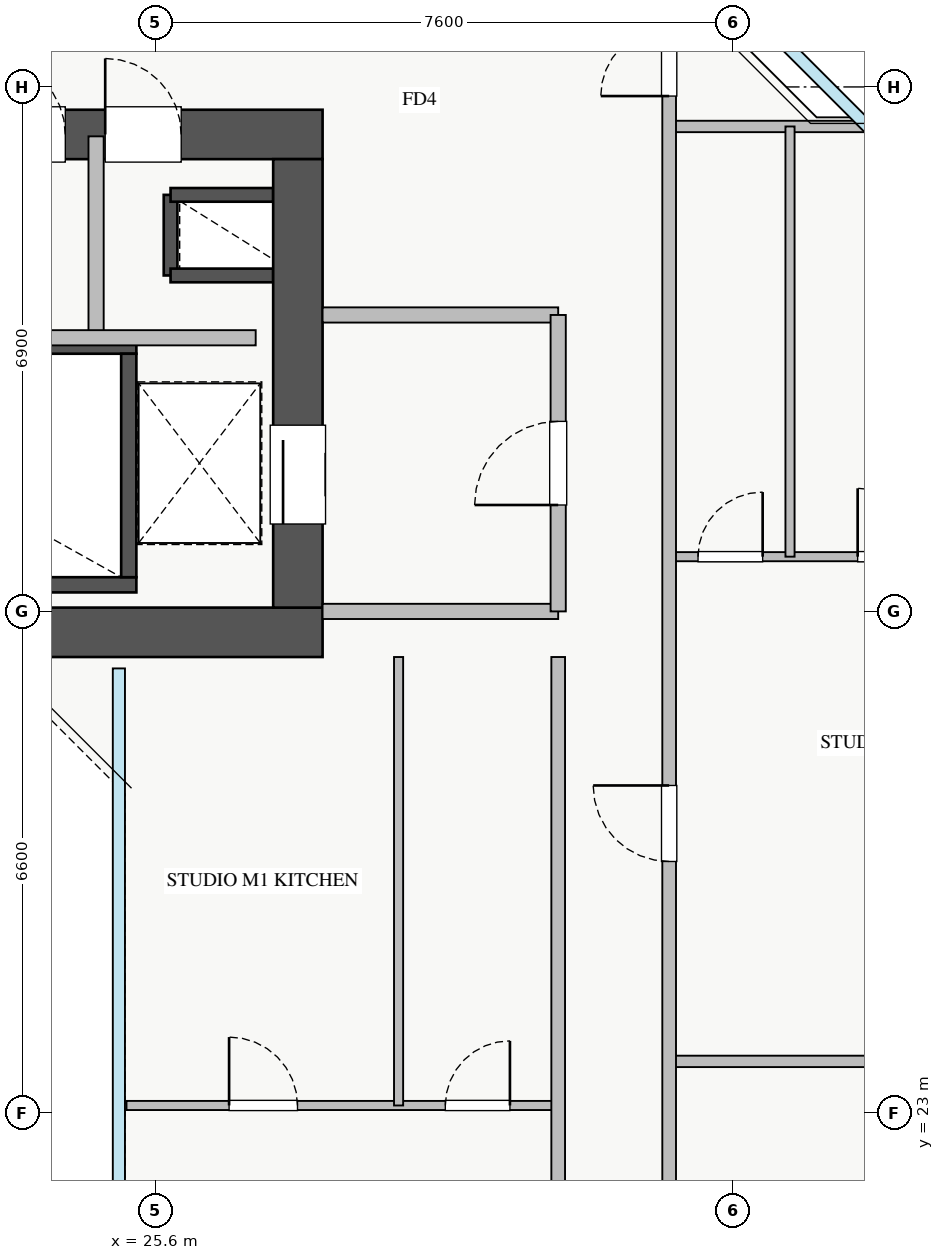
"""IFC4 building model, lengths in metres.
Left out: names, types, materials, properties, quantities, classifications, styles, units other than length and angle.
Written with IfcOpenShell. Run it as: python <this file> out.ifc"""

import sys

from ifc_helpers import new_model, si_unit, direction, frame, frame_2d, origin, place, context, subcontext, project, spatial, rectangle, extrude, source, transform, mapped, element, fill, save


model = new_model("IFC4")
c1 = context("Model", 3, precision=1e-05, world=origin(), true_north=direction((0.0, 1.0)))
c2 = subcontext(c1, "Body", "Model", "MODEL_VIEW")
j1 = project(units=[si_unit("LENGTHUNIT", "METRE"), si_unit("PLANEANGLEUNIT", "RADIAN")], contexts=[c1])
p1 = place(None, origin())
s1 = spatial("IfcSite", under=j1, at=p1, CompositionType="ELEMENT")
p2 = place(p1, origin())
s2 = spatial("IfcBuilding", under=s1, at=p2, CompositionType="ELEMENT")
p3 = place(p2, frame((0.0, 0.0, 143.75)))
s3 = spatial("IfcBuildingStorey", under=s2, at=p3, CompositionType="ELEMENT", Elevation=143.75)
p4 = place(p3, frame((25.8, 34.02, 0.0), z_axis=(0.0, 0.0, 1.0), x_axis=(0.0, 1.0, 0.0)))
e1 = element("IfcWall", 1, at=p4, inside=s3, PredefinedType="SHEAR", context=c2, shape_type="SweptSolid", body=[
    extrude(rectangle(XDim=1.06, YDim=0.18, at=frame_2d((0.53, 0.0))), origin(), (0.0, 0.0, 1.0), 3.07),
])
for number, where, z_axis, x_axis in (
    (2, (25.8, 35.08, 0.0), (0.0, 0.0, 1.0), (1.0, 0.0, 0.0)),
    (3, (25.8, 34.02, 0.0), (0.0, 0.0, 1.0), (1.0, 0.0, 0.0)),
):
    element("IfcWall", number, at=place(p3, frame(where, z_axis=z_axis, x_axis=x_axis)), inside=s3, PredefinedType="SHEAR", context=c2, shape_type="SweptSolid", body=[
        extrude(rectangle(XDim=1.35, YDim=0.18, at=frame_2d((0.675, 0.0))), origin(), (0.0, 0.0, 1.0), 3.07),
    ])
p5 = place(p3, frame((18.2, 29.95, 0.0), z_axis=(0.0, 0.0, 1.0), x_axis=(1.0, 0.0, 0.0)))
e4 = element("IfcWall", 4, at=p5, inside=s3, PredefinedType="SHEAR", context=c2, shape_type="SweptSolid", body=[
    extrude(rectangle(XDim=7.15, YDim=0.2, at=frame_2d((3.575, 0.0))), origin(), (0.0, 0.0, 1.0), 3.25),
])
p6 = place(p3, frame((18.2, 33.09, 0.0), z_axis=(0.0, 0.0, 1.0), x_axis=(1.0, 0.0, 0.0)))
e5 = element("IfcWall", 5, at=p6, inside=s3, PredefinedType="SHEAR", context=c2, shape_type="SweptSolid", body=[
    extrude(rectangle(XDim=7.15, YDim=0.2, at=frame_2d((3.575, 0.0))), origin(), (0.0, 0.0, 1.0), 3.25),
])
p7 = place(p6, frame((0.35, 0.0, 0.0)))
e6 = element("IfcOpeningElement", 6, at=p7, cuts=e5, PredefinedType="OPENING", context=c2, shape_type="SweptSolid", body=[
    extrude(rectangle(XDim=1.1, YDim=2.05, at=frame_2d((0.55, 1.025))), frame((0.0, 0.11, 0.0), z_axis=(0.0, -1.0, 0.0), x_axis=(1.0, 0.0, 0.0)), (0.0, 0.0, 1.0), 0.22),
])
p8 = place(p3, frame((25.25, 30.05, 0.0), z_axis=(0.0, 0.0, 1.0), x_axis=(0.0, 1.0, 0.0)))
e7 = element("IfcWall", 7, at=p8, inside=s3, PredefinedType="SHEAR", context=c2, shape_type="SweptSolid", body=[
    extrude(rectangle(XDim=2.94, YDim=0.2, at=frame_2d((1.47, 0.0))), origin(), (0.0, 0.0, 1.0), 3.25),
])
p9 = place(p3, frame((10.2, 29.325, 0.0), z_axis=(0.0, 0.0, 1.0), x_axis=(1.0, 0.0, 0.0)))
e8 = element("IfcWall", 8, at=p9, inside=s3, PredefinedType="SHEAR", context=c2, shape_type="SweptSolid", body=[
    extrude(rectangle(XDim=17.6, YDim=0.65, at=frame_2d((8.8, 0.0))), origin(), (0.0, 0.0, 1.0), 3.25),
])
p10 = place(p3, frame((10.2, 35.875, 0.0), z_axis=(0.0, 0.0, 1.0), x_axis=(1.0, 0.0, 0.0)))
e9 = element("IfcWall", 9, at=p10, inside=s3, PredefinedType="SHEAR", context=c2, shape_type="SweptSolid", body=[
    extrude(rectangle(XDim=17.6, YDim=0.65, at=frame_2d((8.8, 0.0))), origin(), (0.0, 0.0, 1.0), 3.25),
])
p11 = place(p10, frame((1.15, 0.0, 0.0)))
e10 = element("IfcOpeningElement", 10, at=p11, cuts=e9, PredefinedType="OPENING", context=c2, shape_type="SweptSolid", body=[
    extrude(rectangle(XDim=1.1, YDim=2.05, at=frame_2d((0.55, 1.025))), frame((0.0, 0.335, 0.0), z_axis=(0.0, -1.0, 0.0), x_axis=(1.0, 0.0, 0.0)), (0.0, 0.0, 1.0), 0.67),
])
p12 = place(p10, frame((8.3, 0.0, 0.0)))
e11 = element("IfcOpeningElement", 11, at=p12, cuts=e9, PredefinedType="OPENING", context=c2, shape_type="SweptSolid", body=[
    extrude(rectangle(XDim=1.1, YDim=2.05, at=frame_2d((0.55, 1.025))), frame((0.0, 0.335, 0.0), z_axis=(0.0, -1.0, 0.0), x_axis=(1.0, 0.0, 0.0)), (0.0, 0.0, 1.0), 0.67),
])
p13 = place(p10, frame((4.9, 0.0, 0.0)))
e12 = element("IfcOpeningElement", 12, at=p13, cuts=e9, PredefinedType="OPENING", context=c2, shape_type="SweptSolid", body=[
    extrude(rectangle(XDim=1.1, YDim=2.05, at=frame_2d((0.55, 1.025))), frame((0.0, 0.335, 0.0), z_axis=(0.0, -1.0, 0.0), x_axis=(1.0, 0.0, 0.0)), (0.0, 0.0, 1.0), 0.67),
])
p14 = place(p10, frame((14.74, 0.0, 0.0)))
e13 = element("IfcOpeningElement", 13, at=p14, cuts=e9, PredefinedType="OPENING", context=c2, shape_type="SweptSolid", body=[
    extrude(rectangle(XDim=1.0, YDim=2.05, at=frame_2d((0.5, 1.025))), frame((0.0, 0.335, 0.0), z_axis=(0.0, -1.0, 0.0), x_axis=(1.0, 0.0, 0.0)), (0.0, 0.0, 1.0), 0.67),
])
p15 = place(p10, frame((10.005, 0.0, 0.0)))
e14 = element("IfcOpeningElement", 14, at=p15, cuts=e9, PredefinedType="OPENING", context=c2, shape_type="SweptSolid", body=[
    extrude(rectangle(XDim=1.0, YDim=2.05, at=frame_2d((0.5, 1.025))), frame((0.0, 0.335, 0.0), z_axis=(0.0, -1.0, 0.0), x_axis=(1.0, 0.0, 0.0)), (0.0, 0.0, 1.0), 0.67),
])
p16 = place(p10, frame((11.55, 0.0, 0.0)))
e15 = element("IfcOpeningElement", 15, at=p16, cuts=e9, PredefinedType="OPENING", context=c2, shape_type="SweptSolid", body=[
    extrude(rectangle(XDim=1.0, YDim=2.05, at=frame_2d((0.5, 1.025))), frame((0.0, 0.335, 0.0), z_axis=(0.0, -1.0, 0.0), x_axis=(1.0, 0.0, 0.0)), (0.0, 0.0, 1.0), 0.67),
])
p17 = place(p10, frame((13.215, 0.0, 0.0)))
e16 = element("IfcOpeningElement", 16, at=p17, cuts=e9, PredefinedType="OPENING", context=c2, shape_type="SweptSolid", body=[
    extrude(rectangle(XDim=1.0, YDim=2.05, at=frame_2d((0.5, 1.025))), frame((0.0, 0.335, 0.0), z_axis=(0.0, -1.0, 0.0), x_axis=(1.0, 0.0, 0.0)), (0.0, 0.0, 1.0), 0.67),
])
p18 = place(p3, frame((27.475, 29.65, 0.0), z_axis=(0.0, 0.0, 1.0), x_axis=(0.0, 1.0, 0.0)))
e17 = element("IfcWall", 17, at=p18, inside=s3, PredefinedType="SHEAR", context=c2, shape_type="SweptSolid", body=[
    extrude(rectangle(XDim=5.9, YDim=0.65, at=frame_2d((2.95, 0.0))), origin(), (0.0, 0.0, 1.0), 3.25),
])
p19 = place(p18, frame((1.1, 0.0, 0.0)))
e18 = element("IfcOpeningElement", 18, at=p19, cuts=e17, PredefinedType="OPENING", context=c2, shape_type="SweptSolid", body=[
    extrude(rectangle(XDim=1.3, YDim=2.05, at=frame_2d((0.65, 1.025))), frame((0.0, 0.335, 0.0), z_axis=(0.0, -1.0, 0.0), x_axis=(1.0, 0.0, 0.0)), (0.0, 0.0, 1.0), 0.67),
])
for number, where, z_axis, x_axis in (
    (19, (27.8, 29.6, 0.0), (0.0, 0.0, 1.0), (1.0, 0.0, 0.0)),
    (20, (27.8, 33.5, 0.0), (0.0, 0.0, 1.0), (1.0, 0.0, 0.0)),
):
    element("IfcWall", number, at=place(p3, frame(where, z_axis=z_axis, x_axis=x_axis)), inside=s3, PredefinedType="PARTITIONING", context=c2, shape_type="SweptSolid", body=[
        extrude(rectangle(XDim=3.1, YDim=0.2, at=frame_2d((1.55, 0.0))), origin(), (0.0, 0.0, 1.0), 3.07),
    ])
p20 = place(p3, frame((30.9, 29.6, 0.0), z_axis=(0.0, 0.0, 1.0), x_axis=(0.0, 1.0, 0.0)))
e21 = element("IfcWall", 21, at=p20, inside=s3, PredefinedType="PARTITIONING", context=c2, shape_type="SweptSolid", body=[
    extrude(rectangle(XDim=3.9, YDim=0.2, at=frame_2d((1.95, 0.0))), origin(), (0.0, 0.0, 1.0), 3.07),
])
p21 = place(p20, frame((1.4, 0.0, 0.0)))
e22 = element("IfcOpeningElement", 22, at=p21, cuts=e21, PredefinedType="OPENING", context=c2, shape_type="SweptSolid", body=[
    extrude(rectangle(XDim=1.1, YDim=2.05, at=frame_2d((0.55, 1.025))), frame((0.0, 0.11, 0.0), z_axis=(0.0, -1.0, 0.0), x_axis=(1.0, 0.0, 0.0)), (0.0, 0.0, 1.0), 0.22),
])
p22 = place(p3, frame((24.82, 33.2, 0.0), z_axis=(0.0, 0.0, 1.0), x_axis=(0.0, 1.0, 0.0)))
e23 = element("IfcWall", 23, at=p22, inside=s3, PredefinedType="PARTITIONING", context=c2, shape_type="SweptSolid", body=[
    extrude(rectangle(XDim=2.65, YDim=0.2, at=frame_2d((1.325, 0.0))), origin(), (0.0, 0.0, 1.0), 3.07),
])
p23 = place(p3, frame((21.75, 33.2, 0.0), z_axis=(0.0, 0.0, 1.0), x_axis=(1.0, 0.0, 0.0)))
e24 = element("IfcWall", 24, at=p23, inside=s3, PredefinedType="PARTITIONING", context=c2, shape_type="SweptSolid", body=[
    extrude(rectangle(XDim=5.17, YDim=0.2, at=frame_2d((2.585, 0.0))), origin(), (0.0, 0.0, 1.0), 3.07),
])
p24 = place(p3, frame((32.36, 35.98, 0.0), z_axis=(0.0, 0.0, 1.0), x_axis=(1.0, 0.0, 0.0)))
e25 = element("IfcWall", 25, at=p24, inside=s3, PredefinedType="PARTITIONING", context=c2, shape_type="SweptSolid", body=[
    extrude(rectangle(XDim=4.29, YDim=0.15, at=frame_2d((2.145, 0.0))), origin(), (0.0, 0.0, 1.0), 3.07),
])
p25 = place(p3, frame((32.36, 30.32, 0.0), z_axis=(0.0, 0.0, 1.0), x_axis=(1.0, 0.0, 0.0)))
e26 = element("IfcWall", 26, at=p25, inside=s3, PredefinedType="PLUMBINGWALL", context=c2, shape_type="SweptSolid", body=[
    extrude(rectangle(XDim=4.29, YDim=0.12, at=frame_2d((2.145, 0.0))), origin(), (0.0, 0.0, 1.0), 3.07),
])
p26 = place(p25, frame((0.38, 0.0, 0.0)))
e27 = element("IfcOpeningElement", 27, at=p26, cuts=e26, PredefinedType="OPENING", context=c2, shape_type="SweptSolid", body=[
    extrude(rectangle(XDim=0.85, YDim=2.05, at=frame_2d((0.425, 1.025))), frame((0.0, 0.07, 0.0), z_axis=(0.0, -1.0, 0.0), x_axis=(1.0, 0.0, 0.0)), (0.0, 0.0, 1.0), 0.14),
])
p27 = place(p25, frame((2.48, 0.0, 0.0)))
e28 = element("IfcOpeningElement", 28, at=p27, cuts=e26, PredefinedType="OPENING", context=c2, shape_type="SweptSolid", body=[
    extrude(rectangle(XDim=0.9, YDim=2.05, at=frame_2d((0.45, 1.025))), frame((0.0, 0.07, 0.0), z_axis=(0.0, -1.0, 0.0), x_axis=(1.0, 0.0, 0.0)), (0.0, 0.0, 1.0), 0.14),
])
p28 = place(p3, frame((33.95, 30.32, 0.0), z_axis=(0.0, 0.0, 1.0), x_axis=(0.0, 1.0, 0.0)))
e29 = element("IfcWall", 29, at=p28, inside=s3, PredefinedType="PLUMBINGWALL", context=c2, shape_type="SweptSolid", body=[
    extrude(rectangle(XDim=5.66, YDim=0.12, at=frame_2d((2.83, 0.0))), origin(), (0.0, 0.0, 1.0), 3.07),
])
p29 = place(p3, frame((32.36, 23.68, 0.0), z_axis=(0.0, 0.0, 1.0), x_axis=(1.0, 0.0, 0.0)))
e30 = element("IfcWall", 30, at=p29, inside=s3, PredefinedType="PARTITIONING", context=c2, shape_type="SweptSolid", body=[
    extrude(rectangle(XDim=4.29, YDim=0.15, at=frame_2d((2.145, 0.0))), origin(), (0.0, 0.0, 1.0), 3.07),
])
p30 = place(p3, frame((32.36, 8.3, 0.0), z_axis=(0.0, 0.0, 1.0), x_axis=(0.0, 1.0, 0.0)))
e31 = element("IfcWall", 31, at=p30, inside=s3, PredefinedType="PARTITIONING", context=c2, shape_type="SweptSolid", body=[
    extrude(rectangle(XDim=29.4, YDim=0.18, at=frame_2d((14.7, 0.0))), origin(), (0.0, 0.0, 1.0), 3.07),
])
p31 = place(p30, frame((28.08, 0.0, 0.0)))
e32 = element("IfcOpeningElement", 32, at=p31, cuts=e31, PredefinedType="OPENING", context=c2, shape_type="SweptSolid", body=[
    extrude(rectangle(XDim=0.9, YDim=2.05, at=frame_2d((0.45, 1.025))), frame((0.0, 0.1, 0.0), z_axis=(0.0, -1.0, 0.0), x_axis=(1.0, 0.0, 0.0)), (0.0, 0.0, 1.0), 0.2),
])
p32 = place(p30, frame((0.42, 0.0, 0.0)))
e33 = element("IfcOpeningElement", 33, at=p32, cuts=e31, PredefinedType="OPENING", context=c2, shape_type="SweptSolid", body=[
    extrude(rectangle(XDim=0.9, YDim=2.05, at=frame_2d((0.45, 1.025))), frame((0.0, 0.1, 0.0), z_axis=(0.0, -1.0, 0.0), x_axis=(1.0, 0.0, 0.0)), (0.0, 0.0, 1.0), 0.2),
])
p33 = place(p30, frame((8.05, 0.0, 0.0)))
e34 = element("IfcOpeningElement", 34, at=p33, cuts=e31, PredefinedType="OPENING", context=c2, shape_type="SweptSolid", body=[
    extrude(rectangle(XDim=1.0, YDim=2.05, at=frame_2d((0.5, 1.025))), frame((0.0, 0.1, 0.0), z_axis=(0.0, -1.0, 0.0), x_axis=(1.0, 0.0, 0.0)), (0.0, 0.0, 1.0), 0.2),
])
p34 = place(p30, frame((18.01, 0.0, 0.0)))
e35 = element("IfcOpeningElement", 35, at=p34, cuts=e31, PredefinedType="OPENING", context=c2, shape_type="SweptSolid", body=[
    extrude(rectangle(XDim=1.0, YDim=2.05, at=frame_2d((0.5, 1.025))), frame((0.0, 0.1, 0.0), z_axis=(0.0, -1.0, 0.0), x_axis=(1.0, 0.0, 0.0)), (0.0, 0.0, 1.0), 0.2),
])
p35 = place(p3, frame((25.22, 23.1, 0.0), z_axis=(0.0, 0.0, 1.0), x_axis=(1.0, 0.0, 0.0)))
e36 = element("IfcWall", 36, at=p35, inside=s3, PredefinedType="PLUMBINGWALL", context=c2, shape_type="SweptSolid", body=[
    extrude(rectangle(XDim=5.68, YDim=0.12, at=frame_2d((2.84, 0.0))), origin(), (0.0, 0.0, 1.0), 3.07),
])
p36 = place(p35, frame((1.35, 0.0, 0.0)))
e37 = element("IfcOpeningElement", 37, at=p36, cuts=e36, PredefinedType="OPENING", context=c2, shape_type="SweptSolid", body=[
    extrude(rectangle(XDim=0.9, YDim=2.05, at=frame_2d((0.45, 1.025))), frame((0.0, 0.07, 0.0), z_axis=(0.0, -1.0, 0.0), x_axis=(1.0, 0.0, 0.0)), (0.0, 0.0, 1.0), 0.14),
])
p37 = place(p35, frame((4.195, 0.0, 0.0)))
e38 = element("IfcOpeningElement", 38, at=p37, cuts=e36, PredefinedType="OPENING", context=c2, shape_type="SweptSolid", body=[
    extrude(rectangle(XDim=0.85, YDim=2.05, at=frame_2d((0.425, 1.025))), frame((0.0, 0.07, 0.0), z_axis=(0.0, -1.0, 0.0), x_axis=(1.0, 0.0, 0.0)), (0.0, 0.0, 1.0), 0.14),
])
p38 = place(p3, frame((28.8, 23.1, 0.0), z_axis=(0.0, 0.0, 1.0), x_axis=(0.0, 1.0, 0.0)))
e39 = element("IfcWall", 39, at=p38, inside=s3, PredefinedType="PLUMBINGWALL", context=c2, shape_type="SweptSolid", body=[
    extrude(rectangle(XDim=5.9, YDim=0.12, at=frame_2d((2.95, 0.0))), origin(), (0.0, 0.0, 1.0), 3.07),
])
p39 = place(p3, frame((30.9, 17.0, 0.0), z_axis=(0.0, 0.0, 1.0), x_axis=(0.0, 1.0, 0.0)))
e40 = element("IfcWall", 40, at=p39, inside=s3, PredefinedType="PARTITIONING", context=c2, shape_type="SweptSolid", body=[
    extrude(rectangle(XDim=12.0, YDim=0.18, at=frame_2d((6.0, 0.0))), origin(), (0.0, 0.0, 1.0), 3.07),
])
p40 = place(p39, frame((2.36, 0.0, 0.0)))
e41 = element("IfcOpeningElement", 41, at=p40, cuts=e40, PredefinedType="OPENING", context=c2, shape_type="SweptSolid", body=[
    extrude(rectangle(XDim=1.0, YDim=2.05, at=frame_2d((0.5, 1.025))), frame((0.0, 0.1, 0.0), z_axis=(0.0, -1.0, 0.0), x_axis=(1.0, 0.0, 0.0)), (0.0, 0.0, 1.0), 0.2),
])
m1 = source(origin(), c2, "Body", "SweptSolid", [
    extrude(rectangle(XDim=1.3, YDim=2.05, at=frame_2d((0.65, 1.025))), frame((0.0, 0.025, 0.0), z_axis=(0.0, -1.0, 0.0), x_axis=(1.0, 0.0, 0.0)), (0.0, 0.0, 1.0), 0.05),
])
p41 = place(p19, origin())
e42 = element("IfcDoor", 42, at=p41, inside=s3, OperationType="SLIDING_TO_LEFT", PredefinedType="DOOR", context=c2, shape_type="MappedRepresentation", body=[
    mapped(m1, transform((0.0, 0.0, 0.0), x_axis=(1.0, 0.0, 0.0), y_axis=(0.0, 1.0, 0.0), z_axis=(0.0, 0.0, 1.0), scale=1.0)),
])
fill(e18, e42)
m2 = source(origin(), c2, "Body", "SweptSolid", [
    extrude(rectangle(XDim=1.0, YDim=2.05, at=frame_2d((0.5, 1.025))), frame((0.0, 0.025, 0.0), z_axis=(0.0, -1.0, 0.0), x_axis=(1.0, 0.0, 0.0)), (0.0, 0.0, 1.0), 0.05),
])
p42 = place(p14, origin())
e43 = element("IfcDoor", 43, at=p42, inside=s3, OperationType="SINGLE_SWING_LEFT", PredefinedType="DOOR", context=c2, shape_type="MappedRepresentation", body=[
    mapped(m2, transform((0.0, 0.0, 0.0), x_axis=(1.0, 0.0, 0.0), y_axis=(0.0, 1.0, 0.0), z_axis=(0.0, 0.0, 1.0), scale=1.0)),
])
fill(e13, e43)
p43 = place(p17, origin())
e44 = element("IfcDoor", 44, at=p43, inside=s3, OperationType="SINGLE_SWING_LEFT", PredefinedType="DOOR", context=c2, shape_type="MappedRepresentation", body=[
    mapped(m2, transform((0.0, 0.0, 0.0), x_axis=(1.0, 0.0, 0.0), y_axis=(0.0, 1.0, 0.0), z_axis=(0.0, 0.0, 1.0), scale=1.0)),
])
fill(e16, e44)
m3 = source(origin(), c2, "Body", "SweptSolid", [
    extrude(rectangle(XDim=1.1, YDim=2.05, at=frame_2d((0.55, 1.025))), frame((0.0, 0.025, 0.0), z_axis=(0.0, -1.0, 0.0), x_axis=(1.0, 0.0, 0.0)), (0.0, 0.0, 1.0), 0.05),
])
p44 = place(p21, origin())
e45 = element("IfcDoor", 45, at=p44, inside=s3, OperationType="SINGLE_SWING_LEFT", PredefinedType="DOOR", context=c2, shape_type="MappedRepresentation", body=[
    mapped(m3, transform((0.0, 0.0, 0.0), x_axis=(1.0, 0.0, 0.0), y_axis=(0.0, 1.0, 0.0), z_axis=(0.0, 0.0, 1.0), scale=1.0)),
])
fill(e22, e45)
m4 = source(origin(), c2, "Body", "SweptSolid", [
    extrude(rectangle(XDim=0.85, YDim=2.05, at=frame_2d((0.425, 1.025))), frame((0.0, 0.025, 0.0), z_axis=(0.0, -1.0, 0.0), x_axis=(1.0, 0.0, 0.0)), (0.0, 0.0, 1.0), 0.05),
])
p45 = place(p26, origin())
e46 = element("IfcDoor", 46, at=p45, inside=s3, OperationType="SINGLE_SWING_RIGHT", PredefinedType="DOOR", context=c2, shape_type="MappedRepresentation", body=[
    mapped(m4, transform((0.0, 0.0, 0.0), x_axis=(1.0, 0.0, 0.0), y_axis=(0.0, 1.0, 0.0), z_axis=(0.0, 0.0, 1.0), scale=1.0)),
])
fill(e27, e46)
m5 = source(origin(), c2, "Body", "SweptSolid", [
    extrude(rectangle(XDim=0.9, YDim=2.05, at=frame_2d((0.45, 1.025))), frame((0.0, 0.025, 0.0), z_axis=(0.0, -1.0, 0.0), x_axis=(1.0, 0.0, 0.0)), (0.0, 0.0, 1.0), 0.05),
])
p46 = place(p27, origin())
e47 = element("IfcDoor", 47, at=p46, inside=s3, OperationType="SINGLE_SWING_LEFT", PredefinedType="DOOR", context=c2, shape_type="MappedRepresentation", body=[
    mapped(m5, transform((0.0, 0.0, 0.0), x_axis=(1.0, 0.0, 0.0), y_axis=(0.0, 1.0, 0.0), z_axis=(0.0, 0.0, 1.0), scale=1.0)),
])
fill(e28, e47)
p47 = place(p31, origin())
e48 = element("IfcDoor", 48, at=p47, inside=s3, OperationType="SINGLE_SWING_LEFT", PredefinedType="DOOR", context=c2, shape_type="MappedRepresentation", body=[
    mapped(m5, transform((0.0, 0.0, 0.0), x_axis=(1.0, 0.0, 0.0), y_axis=(0.0, 1.0, 0.0), z_axis=(0.0, 0.0, 1.0), scale=1.0)),
])
fill(e32, e48)
p48 = place(p34, origin())
e49 = element("IfcDoor", 49, at=p48, inside=s3, OperationType="SINGLE_SWING_RIGHT", PredefinedType="DOOR", context=c2, shape_type="MappedRepresentation", body=[
    mapped(m2, transform((0.0, 0.0, 0.0), x_axis=(1.0, 0.0, 0.0), y_axis=(0.0, 1.0, 0.0), z_axis=(0.0, 0.0, 1.0), scale=1.0)),
])
fill(e35, e49)
p49 = place(p36, origin())
e50 = element("IfcDoor", 50, at=p49, inside=s3, OperationType="SINGLE_SWING_LEFT", PredefinedType="DOOR", context=c2, shape_type="MappedRepresentation", body=[
    mapped(m5, transform((0.0, 0.0, 0.0), x_axis=(1.0, 0.0, 0.0), y_axis=(0.0, 1.0, 0.0), z_axis=(0.0, 0.0, 1.0), scale=1.0)),
])
fill(e37, e50)
p50 = place(p37, origin())
e51 = element("IfcDoor", 51, at=p50, inside=s3, OperationType="SINGLE_SWING_RIGHT", PredefinedType="DOOR", context=c2, shape_type="MappedRepresentation", body=[
    mapped(m4, transform((0.0, 0.0, 0.0), x_axis=(1.0, 0.0, 0.0), y_axis=(0.0, 1.0, 0.0), z_axis=(0.0, 0.0, 1.0), scale=1.0)),
])
fill(e38, e51)
save(model, sys.argv[1])
